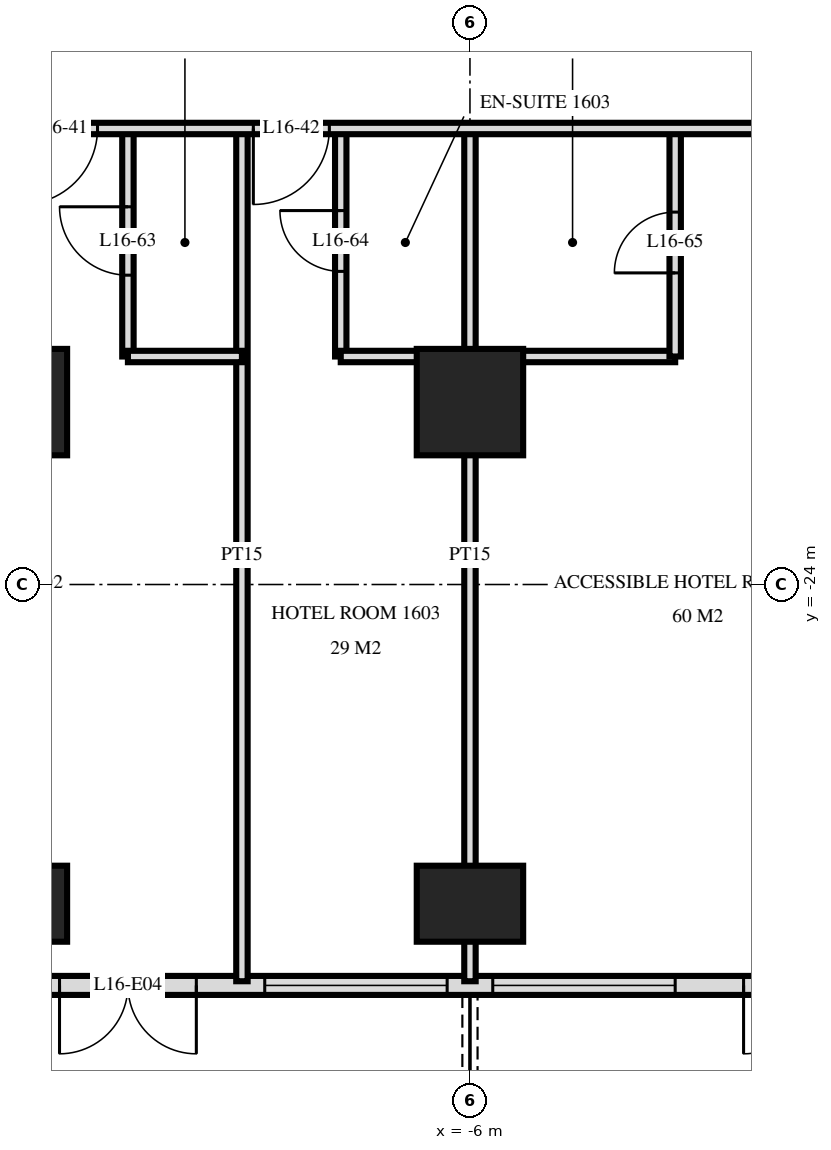
"""IFC4 building model, lengths in metres.
Left out: names, types, materials, properties, quantities, classifications, styles, units other than length and angle.
Written with IfcOpenShell. Run it as: python <this file> out.ifc"""

import sys

from ifc_helpers import new_model, si_unit, direction, frame, frame_2d, origin, origin_2d, place, context, subcontext, project, spatial, rectangle, extrude, element, fill, save


model = new_model("IFC4")
c1 = context("Model", 3, precision=1e-05, world=origin(), true_north=direction((0.0, 1.0)))
c2 = subcontext(c1, "Body", "Model", "MODEL_VIEW")
j1 = project(units=[si_unit("LENGTHUNIT", "METRE"), si_unit("PLANEANGLEUNIT", "RADIAN")], contexts=[c1])
p1 = place(None, origin())
s1 = spatial("IfcSite", under=j1, at=p1, CompositionType="ELEMENT")
p2 = place(p1, origin())
s2 = spatial("IfcBuilding", under=s1, at=p2, CompositionType="ELEMENT")
p3 = place(p2, frame((0.0, 0.0, 67.2)))
s3 = spatial("IfcBuildingStorey", under=s2, at=p3, CompositionType="ELEMENT", Elevation=67.2)
p4 = place(p3, frame((-12.0, -28.2, 0.0), z_axis=(0.0, 0.0, 1.0), x_axis=(1.0, 0.0, 0.0)))
e1 = element("IfcColumn", 1, at=p4, inside=s3, PredefinedType="COLUMN", context=c2, shape_type="SweptSolid", body=[
    extrude(rectangle(XDim=1.4, YDim=1.0, at=origin_2d()), origin(), (0.0, 0.0, 1.0), 3.6),
])
p5 = place(p3, frame((-12.0, -21.6, 0.0), z_axis=(0.0, 0.0, 1.0), x_axis=(1.0, 0.0, 0.0)))
e2 = element("IfcColumn", 2, at=p5, inside=s3, PredefinedType="COLUMN", context=c2, shape_type="SweptSolid", body=[
    extrude(rectangle(XDim=1.4, YDim=1.4, at=origin_2d()), origin(), (0.0, 0.0, 1.0), 3.6),
])
p6 = place(p3, frame((-6.0, -28.2, 0.0), z_axis=(0.0, 0.0, 1.0), x_axis=(1.0, 0.0, 0.0)))
e3 = element("IfcColumn", 3, at=p6, inside=s3, PredefinedType="COLUMN", context=c2, shape_type="SweptSolid", body=[
    extrude(rectangle(XDim=1.4, YDim=1.0, at=origin_2d()), origin(), (0.0, 0.0, 1.0), 3.6),
])
p7 = place(p3, frame((-6.0, -21.6, 0.0), z_axis=(0.0, 0.0, 1.0), x_axis=(1.0, 0.0, 0.0)))
e4 = element("IfcColumn", 4, at=p7, inside=s3, PredefinedType="COLUMN", context=c2, shape_type="SweptSolid", body=[
    extrude(rectangle(XDim=1.4, YDim=1.4, at=origin_2d()), origin(), (0.0, 0.0, 1.0), 3.6),
])
p8 = place(p3, frame((-28.775, -29.275, 0.0), z_axis=(0.0, 0.0, 1.0), x_axis=(1.0, 0.0, 0.0)))
e5 = element("IfcWall", 5, at=p8, inside=s3, PredefinedType="SOLIDWALL", context=c2, shape_type="SweptSolid", body=[
    extrude(rectangle(XDim=57.551, YDim=0.25, at=frame_2d((28.775, 0.0))), origin(), (0.0, 0.0, 1.0), 3.32),
])
p9 = place(p8, frame((0.575, 0.0, 0.0)))
e6 = element("IfcOpeningElement", 6, at=p9, cuts=e5, PredefinedType="OPENING", context=c2, shape_type="SweptSolid", body=[
    extrude(rectangle(XDim=1.8, YDim=2.4, at=frame_2d((0.9, 1.2))), frame((0.0, 0.135, 0.0), z_axis=(0.0, -1.0, 0.0), x_axis=(1.0, 0.0, 0.0)), (0.0, 0.0, 1.0), 0.27),
])
p10 = place(p8, frame((5.075, 0.0, 0.3)))
e7 = element("IfcOpeningElement", 7, at=p10, cuts=e5, PredefinedType="OPENING", context=c2, shape_type="SweptSolid", body=[
    extrude(rectangle(XDim=2.4, YDim=2.1, at=frame_2d((1.2, 1.05))), frame((0.0, 0.135, 0.0), z_axis=(0.0, -1.0, 0.0), x_axis=(1.0, 0.0, 0.0)), (0.0, 0.0, 1.0), 0.27),
])
p11 = place(p8, frame((8.375, 0.0, 0.0)))
e8 = element("IfcOpeningElement", 8, at=p11, cuts=e5, PredefinedType="OPENING", context=c2, shape_type="SweptSolid", body=[
    extrude(rectangle(XDim=1.8, YDim=2.4, at=frame_2d((0.9, 1.2))), frame((0.0, 0.135, 0.0), z_axis=(0.0, -1.0, 0.0), x_axis=(1.0, 0.0, 0.0)), (0.0, 0.0, 1.0), 0.27),
])
p12 = place(p8, frame((11.375, 0.0, 0.0)))
e9 = element("IfcOpeningElement", 9, at=p12, cuts=e5, PredefinedType="OPENING", context=c2, shape_type="SweptSolid", body=[
    extrude(rectangle(XDim=1.8, YDim=2.4, at=frame_2d((0.9, 1.2))), frame((0.0, 0.135, 0.0), z_axis=(0.0, -1.0, 0.0), x_axis=(1.0, 0.0, 0.0)), (0.0, 0.0, 1.0), 0.27),
])
p13 = place(p8, frame((14.075, 0.0, 0.3)))
e10 = element("IfcOpeningElement", 10, at=p13, cuts=e5, PredefinedType="OPENING", context=c2, shape_type="SweptSolid", body=[
    extrude(rectangle(XDim=2.4, YDim=2.1, at=frame_2d((1.2, 1.05))), frame((0.0, 0.135, 0.0), z_axis=(0.0, -1.0, 0.0), x_axis=(1.0, 0.0, 0.0)), (0.0, 0.0, 1.0), 0.27),
])
p14 = place(p8, frame((17.375, 0.0, 0.0)))
e11 = element("IfcOpeningElement", 11, at=p14, cuts=e5, PredefinedType="OPENING", context=c2, shape_type="SweptSolid", body=[
    extrude(rectangle(XDim=1.8, YDim=2.4, at=frame_2d((0.9, 1.2))), frame((0.0, 0.135, 0.0), z_axis=(0.0, -1.0, 0.0), x_axis=(1.0, 0.0, 0.0)), (0.0, 0.0, 1.0), 0.27),
])
p15 = place(p8, frame((20.075, 0.0, 0.3)))
e12 = element("IfcOpeningElement", 12, at=p15, cuts=e5, PredefinedType="OPENING", context=c2, shape_type="SweptSolid", body=[
    extrude(rectangle(XDim=2.4, YDim=2.1, at=frame_2d((1.2, 1.05))), frame((0.0, 0.135, 0.0), z_axis=(0.0, -1.0, 0.0), x_axis=(1.0, 0.0, 0.0)), (0.0, 0.0, 1.0), 0.27),
])
p16 = place(p8, frame((23.075, 0.0, 0.3)))
e13 = element("IfcOpeningElement", 13, at=p16, cuts=e5, PredefinedType="OPENING", context=c2, shape_type="SweptSolid", body=[
    extrude(rectangle(XDim=2.4, YDim=2.1, at=frame_2d((1.2, 1.05))), frame((0.0, 0.135, 0.0), z_axis=(0.0, -1.0, 0.0), x_axis=(1.0, 0.0, 0.0)), (0.0, 0.0, 1.0), 0.27),
])
p17 = place(p8, frame((26.375, 0.0, 0.0)))
e14 = element("IfcOpeningElement", 14, at=p17, cuts=e5, PredefinedType="OPENING", context=c2, shape_type="SweptSolid", body=[
    extrude(rectangle(XDim=1.8, YDim=2.4, at=frame_2d((0.9, 1.2))), frame((0.0, 0.135, 0.0), z_axis=(0.0, -1.0, 0.0), x_axis=(1.0, 0.0, 0.0)), (0.0, 0.0, 1.0), 0.27),
])
p18 = place(p8, frame((29.375, 0.0, 0.0)))
e15 = element("IfcOpeningElement", 15, at=p18, cuts=e5, PredefinedType="OPENING", context=c2, shape_type="SweptSolid", body=[
    extrude(rectangle(XDim=1.8, YDim=2.4, at=frame_2d((0.9, 1.2))), frame((0.0, 0.135, 0.0), z_axis=(0.0, -1.0, 0.0), x_axis=(1.0, 0.0, 0.0)), (0.0, 0.0, 1.0), 0.27),
])
p19 = place(p8, frame((32.075, 0.0, 0.3)))
e16 = element("IfcOpeningElement", 16, at=p19, cuts=e5, PredefinedType="OPENING", context=c2, shape_type="SweptSolid", body=[
    extrude(rectangle(XDim=2.4, YDim=2.1, at=frame_2d((1.2, 1.05))), frame((0.0, 0.135, 0.0), z_axis=(0.0, -1.0, 0.0), x_axis=(1.0, 0.0, 0.0)), (0.0, 0.0, 1.0), 0.27),
])
p20 = place(p8, frame((35.375, 0.0, 0.0)))
e17 = element("IfcOpeningElement", 17, at=p20, cuts=e5, PredefinedType="OPENING", context=c2, shape_type="SweptSolid", body=[
    extrude(rectangle(XDim=1.8, YDim=2.4, at=frame_2d((0.9, 1.2))), frame((0.0, 0.135, 0.0), z_axis=(0.0, -1.0, 0.0), x_axis=(1.0, 0.0, 0.0)), (0.0, 0.0, 1.0), 0.27),
])
p21 = place(p8, frame((38.075, 0.0, 0.3)))
e18 = element("IfcOpeningElement", 18, at=p21, cuts=e5, PredefinedType="OPENING", context=c2, shape_type="SweptSolid", body=[
    extrude(rectangle(XDim=2.4, YDim=2.1, at=frame_2d((1.2, 1.05))), frame((0.0, 0.135, 0.0), z_axis=(0.0, -1.0, 0.0), x_axis=(1.0, 0.0, 0.0)), (0.0, 0.0, 1.0), 0.27),
])
p22 = place(p8, frame((41.075, 0.0, 0.3)))
e19 = element("IfcOpeningElement", 19, at=p22, cuts=e5, PredefinedType="OPENING", context=c2, shape_type="SweptSolid", body=[
    extrude(rectangle(XDim=2.4, YDim=2.1, at=frame_2d((1.2, 1.05))), frame((0.0, 0.135, 0.0), z_axis=(0.0, -1.0, 0.0), x_axis=(1.0, 0.0, 0.0)), (0.0, 0.0, 1.0), 0.27),
])
p23 = place(p8, frame((44.375, 0.0, 0.0)))
e20 = element("IfcOpeningElement", 20, at=p23, cuts=e5, PredefinedType="OPENING", context=c2, shape_type="SweptSolid", body=[
    extrude(rectangle(XDim=1.8, YDim=2.4, at=frame_2d((0.9, 1.2))), frame((0.0, 0.135, 0.0), z_axis=(0.0, -1.0, 0.0), x_axis=(1.0, 0.0, 0.0)), (0.0, 0.0, 1.0), 0.27),
])
p24 = place(p8, frame((47.075, 0.0, 0.3)))
e21 = element("IfcOpeningElement", 21, at=p24, cuts=e5, PredefinedType="OPENING", context=c2, shape_type="SweptSolid", body=[
    extrude(rectangle(XDim=2.4, YDim=2.1, at=frame_2d((1.2, 1.05))), frame((0.0, 0.135, 0.0), z_axis=(0.0, -1.0, 0.0), x_axis=(1.0, 0.0, 0.0)), (0.0, 0.0, 1.0), 0.27),
])
p25 = place(p8, frame((50.375, 0.0, 0.0)))
e22 = element("IfcOpeningElement", 22, at=p25, cuts=e5, PredefinedType="OPENING", context=c2, shape_type="SweptSolid", body=[
    extrude(rectangle(XDim=1.8, YDim=2.4, at=frame_2d((0.9, 1.2))), frame((0.0, 0.135, 0.0), z_axis=(0.0, -1.0, 0.0), x_axis=(1.0, 0.0, 0.0)), (0.0, 0.0, 1.0), 0.27),
])
p26 = place(p8, frame((53.375, 0.0, 0.0)))
e23 = element("IfcOpeningElement", 23, at=p26, cuts=e5, PredefinedType="OPENING", context=c2, shape_type="SweptSolid", body=[
    extrude(rectangle(XDim=1.8, YDim=2.4, at=frame_2d((0.9, 1.2))), frame((0.0, 0.135, 0.0), z_axis=(0.0, -1.0, 0.0), x_axis=(1.0, 0.0, 0.0)), (0.0, 0.0, 1.0), 0.27),
])
p27 = place(p3, frame((-3.3, -21.0, 0.0), z_axis=(0.0, 0.0, 1.0), x_axis=(0.0, 1.0, 0.0)))
e24 = element("IfcWall", 24, at=p27, inside=s3, PredefinedType="PARTITIONING", context=c2, shape_type="SweptSolid", body=[
    extrude(rectangle(XDim=3.0, YDim=0.15, at=frame_2d((1.5, 0.0))), origin(), (0.0, 0.0, 1.0), 3.32),
])
p28 = place(p27, frame((1.1, 0.0, 0.0)))
e25 = element("IfcOpeningElement", 25, at=p28, cuts=e24, PredefinedType="OPENING", context=c2, shape_type="SweptSolid", body=[
    extrude(rectangle(XDim=0.8, YDim=2.1, at=frame_2d((0.4, 1.05))), frame((0.0, 0.085, 0.0), z_axis=(0.0, -1.0, 0.0), x_axis=(1.0, 0.0, 0.0)), (0.0, 0.0, 1.0), 0.17),
])
p29 = place(p3, frame((-6.0, -29.22, 0.0), z_axis=(0.0, 0.0, 1.0), x_axis=(0.0, 1.0, 0.0)))
e26 = element("IfcWall", 26, at=p29, inside=s3, PredefinedType="PARTITIONING", context=c2, shape_type="SweptSolid", body=[
    extrude(rectangle(XDim=11.22, YDim=0.15, at=frame_2d((5.61, 0.0))), origin(), (0.0, 0.0, 1.0), 3.32),
])
p30 = place(p3, frame((-7.7, -21.0, 0.0), z_axis=(0.0, 0.0, 1.0), x_axis=(0.0, 1.0, 0.0)))
e27 = element("IfcWall", 27, at=p30, inside=s3, PredefinedType="PARTITIONING", context=c2, shape_type="SweptSolid", body=[
    extrude(rectangle(XDim=3.0, YDim=0.15, at=frame_2d((1.5, 0.0))), origin(), (0.0, 0.0, 1.0), 3.32),
])
p31 = place(p30, frame((1.12, 0.0, 0.0)))
e28 = element("IfcOpeningElement", 28, at=p31, cuts=e27, PredefinedType="OPENING", context=c2, shape_type="SweptSolid", body=[
    extrude(rectangle(XDim=0.8, YDim=2.1, at=frame_2d((0.4, 1.05))), frame((0.0, 0.085, 0.0), z_axis=(0.0, -1.0, 0.0), x_axis=(1.0, 0.0, 0.0)), (0.0, 0.0, 1.0), 0.17),
])
p32 = place(p3, frame((-9.0, -29.22, 0.0), z_axis=(0.0, 0.0, 1.0), x_axis=(0.0, 1.0, 0.0)))
e29 = element("IfcWall", 29, at=p32, inside=s3, PredefinedType="PARTITIONING", context=c2, shape_type="SweptSolid", body=[
    extrude(rectangle(XDim=11.22, YDim=0.15, at=frame_2d((5.61, 0.0))), origin(), (0.0, 0.0, 1.0), 3.32),
])
p33 = place(p3, frame((-10.5, -21.0, 0.0), z_axis=(0.0, 0.0, 1.0), x_axis=(0.0, 1.0, 0.0)))
e30 = element("IfcWall", 30, at=p33, inside=s3, PredefinedType="PARTITIONING", context=c2, shape_type="SweptSolid", body=[
    extrude(rectangle(XDim=3.0, YDim=0.15, at=frame_2d((1.5, 0.0))), origin(), (0.0, 0.0, 1.0), 3.32),
])
p34 = place(p33, frame((1.07, 0.0, 0.0)))
e31 = element("IfcOpeningElement", 31, at=p34, cuts=e30, PredefinedType="OPENING", context=c2, shape_type="SweptSolid", body=[
    extrude(rectangle(XDim=0.9, YDim=2.1, at=frame_2d((0.45, 1.05))), frame((0.0, 0.085, 0.0), z_axis=(0.0, -1.0, 0.0), x_axis=(1.0, 0.0, 0.0)), (0.0, 0.0, 1.0), 0.17),
])
p35 = place(p3, frame((-10.5, -21.0, 0.0), z_axis=(0.0, 0.0, 1.0), x_axis=(1.0, 0.0, 0.0)))
e32 = element("IfcWall", 32, at=p35, inside=s3, PredefinedType="PARTITIONING", context=c2, shape_type="SweptSolid", body=[
    extrude(rectangle(XDim=1.5, YDim=0.15, at=frame_2d((0.75, 0.0))), origin(), (0.0, 0.0, 1.0), 3.32),
])
p36 = place(p3, frame((-7.7, -21.0, 0.0), z_axis=(0.0, 0.0, 1.0), x_axis=(1.0, 0.0, 0.0)))
e33 = element("IfcWall", 33, at=p36, inside=s3, PredefinedType="PARTITIONING", context=c2, shape_type="SweptSolid", body=[
    extrude(rectangle(XDim=4.4, YDim=0.15, at=frame_2d((2.2, 0.0))), origin(), (0.0, 0.0, 1.0), 3.32),
])
p37 = place(p3, frame((-33.12, -18.0, 0.0), z_axis=(0.0, 0.0, 1.0), x_axis=(1.0, 0.0, 0.0)))
e34 = element("IfcWall", 34, at=p37, inside=s3, PredefinedType="PARTITIONING", context=c2, shape_type="SweptSolid", body=[
    extrude(rectangle(XDim=66.24, YDim=0.15, at=frame_2d((33.12, 0.0))), origin(), (0.0, 0.0, 1.0), 3.32),
])
p38 = place(p37, frame((15.27, 0.0, 0.0)))
e35 = element("IfcOpeningElement", 35, at=p38, cuts=e34, PredefinedType="OPENING", context=c2, shape_type="SweptSolid", body=[
    extrude(rectangle(XDim=1.0, YDim=2.1, at=frame_2d((0.5, 1.05))), frame((0.0, 0.085, 0.0), z_axis=(0.0, -1.0, 0.0), x_axis=(1.0, 0.0, 0.0)), (0.0, 0.0, 1.0), 0.17),
])
p39 = place(p37, frame((21.22, 0.0, 0.0)))
e36 = element("IfcOpeningElement", 36, at=p39, cuts=e34, PredefinedType="OPENING", context=c2, shape_type="SweptSolid", body=[
    extrude(rectangle(XDim=1.0, YDim=2.1, at=frame_2d((0.5, 1.05))), frame((0.0, 0.085, 0.0), z_axis=(0.0, -1.0, 0.0), x_axis=(1.0, 0.0, 0.0)), (0.0, 0.0, 1.0), 0.17),
])
p40 = place(p37, frame((24.27, 0.0, 0.0)))
e37 = element("IfcOpeningElement", 37, at=p40, cuts=e34, PredefinedType="OPENING", context=c2, shape_type="SweptSolid", body=[
    extrude(rectangle(XDim=1.0, YDim=2.1, at=frame_2d((0.5, 1.05))), frame((0.0, 0.085, 0.0), z_axis=(0.0, -1.0, 0.0), x_axis=(1.0, 0.0, 0.0)), (0.0, 0.0, 1.0), 0.17),
])
p41 = place(p37, frame((30.97, 0.0, 0.0)))
e38 = element("IfcOpeningElement", 38, at=p41, cuts=e34, PredefinedType="OPENING", context=c2, shape_type="SweptSolid", body=[
    extrude(rectangle(XDim=1.0, YDim=2.1, at=frame_2d((0.5, 1.05))), frame((0.0, 0.085, 0.0), z_axis=(0.0, -1.0, 0.0), x_axis=(1.0, 0.0, 0.0)), (0.0, 0.0, 1.0), 0.17),
])
p42 = place(p37, frame((40.42, 0.0, 0.0)))
e39 = element("IfcOpeningElement", 39, at=p42, cuts=e34, PredefinedType="OPENING", context=c2, shape_type="SweptSolid", body=[
    extrude(rectangle(XDim=1.0, YDim=2.1, at=frame_2d((0.5, 1.05))), frame((0.0, 0.085, 0.0), z_axis=(0.0, -1.0, 0.0), x_axis=(1.0, 0.0, 0.0)), (0.0, 0.0, 1.0), 0.17),
])
p43 = place(p37, frame((43.97, 0.0, 0.0)))
e40 = element("IfcOpeningElement", 40, at=p43, cuts=e34, PredefinedType="OPENING", context=c2, shape_type="SweptSolid", body=[
    extrude(rectangle(XDim=1.0, YDim=2.1, at=frame_2d((0.5, 1.05))), frame((0.0, 0.085, 0.0), z_axis=(0.0, -1.0, 0.0), x_axis=(1.0, 0.0, 0.0)), (0.0, 0.0, 1.0), 0.17),
])
p44 = place(p37, frame((45.52, 0.0, 0.0)))
e41 = element("IfcOpeningElement", 41, at=p44, cuts=e34, PredefinedType="OPENING", context=c2, shape_type="SweptSolid", body=[
    extrude(rectangle(XDim=1.0, YDim=2.1, at=frame_2d((0.5, 1.05))), frame((0.0, 0.085, 0.0), z_axis=(0.0, -1.0, 0.0), x_axis=(1.0, 0.0, 0.0)), (0.0, 0.0, 1.0), 0.17),
])
p45 = place(p37, frame((52.97, 0.0, 0.0)))
e42 = element("IfcOpeningElement", 42, at=p45, cuts=e34, PredefinedType="OPENING", context=c2, shape_type="SweptSolid", body=[
    extrude(rectangle(XDim=1.0, YDim=2.1, at=frame_2d((0.5, 1.05))), frame((0.0, 0.085, 0.0), z_axis=(0.0, -1.0, 0.0), x_axis=(1.0, 0.0, 0.0)), (0.0, 0.0, 1.0), 0.17),
])
p46 = place(p37, frame((54.27, 0.0, 0.0)))
e43 = element("IfcOpeningElement", 43, at=p46, cuts=e34, PredefinedType="OPENING", context=c2, shape_type="SweptSolid", body=[
    extrude(rectangle(XDim=1.0, YDim=2.1, at=frame_2d((0.5, 1.05))), frame((0.0, 0.085, 0.0), z_axis=(0.0, -1.0, 0.0), x_axis=(1.0, 0.0, 0.0)), (0.0, 0.0, 1.0), 0.17),
])
p47 = place(p37, frame((13.42, 0.0, 0.0)))
e44 = element("IfcOpeningElement", 44, at=p47, cuts=e34, PredefinedType="OPENING", context=c2, shape_type="SweptSolid", body=[
    extrude(rectangle(XDim=1.0, YDim=2.1, at=frame_2d((0.5, 1.05))), frame((0.0, 0.085, 0.0), z_axis=(0.0, -1.0, 0.0), x_axis=(1.0, 0.0, 0.0)), (0.0, 0.0, 1.0), 0.17),
])
p48 = place(p37, frame((60.82, 0.0, 0.0)))
e45 = element("IfcOpeningElement", 45, at=p48, cuts=e34, PredefinedType="OPENING", context=c2, shape_type="SweptSolid", body=[
    extrude(rectangle(XDim=1.0, YDim=2.1, at=frame_2d((0.5, 1.05))), frame((0.0, 0.085, 0.0), z_axis=(0.0, -1.0, 0.0), x_axis=(1.0, 0.0, 0.0)), (0.0, 0.0, 1.0), 0.17),
])
p49 = place(p14, frame((0.9, 0.0, 0.0), z_axis=(0.0, 0.0, 1.0), x_axis=(-1.0, 0.0, 0.0)))
e46 = element("IfcDoor", 46, at=p49, inside=s3, OperationType="DOUBLE_DOOR_SINGLE_SWING", PredefinedType="DOOR", context=c2, shape_type="SweptSolid", body=[
    extrude(rectangle(XDim=1.8, YDim=2.4, at=frame_2d((0.0, 1.2))), frame((0.0, -0.025, 0.0), z_axis=(0.0, 1.0, 0.0), x_axis=(-1.0, 0.0, 0.0)), (0.0, 0.0, 1.0), 0.05),
])
fill(e11, e46)
p50 = place(p15, origin())
e47 = element("IfcWindow", 47, at=p50, inside=s3, PartitioningType="SINGLE_PANEL", PredefinedType="WINDOW", context=c2, shape_type="SweptSolid", body=[
    extrude(rectangle(XDim=2.4, YDim=2.1, at=frame_2d((1.2, 1.05))), frame((0.0, 0.03, 0.0), z_axis=(0.0, -1.0, 0.0), x_axis=(1.0, 0.0, 0.0)), (0.0, 0.0, 1.0), 0.06),
])
fill(e12, e47)
p51 = place(p16, origin())
e48 = element("IfcWindow", 48, at=p51, inside=s3, PartitioningType="SINGLE_PANEL", PredefinedType="WINDOW", context=c2, shape_type="SweptSolid", body=[
    extrude(rectangle(XDim=2.4, YDim=2.1, at=frame_2d((1.2, 1.05))), frame((0.0, 0.03, 0.0), z_axis=(0.0, -1.0, 0.0), x_axis=(1.0, 0.0, 0.0)), (0.0, 0.0, 1.0), 0.06),
])
fill(e13, e48)
p52 = place(p17, frame((0.9, 0.0, 0.0), z_axis=(0.0, 0.0, 1.0), x_axis=(-1.0, 0.0, 0.0)))
e49 = element("IfcDoor", 49, at=p52, inside=s3, OperationType="DOUBLE_DOOR_SINGLE_SWING", PredefinedType="DOOR", context=c2, shape_type="SweptSolid", body=[
    extrude(rectangle(XDim=1.8, YDim=2.4, at=frame_2d((0.0, 1.2))), frame((0.0, -0.025, 0.0), z_axis=(0.0, 1.0, 0.0), x_axis=(-1.0, 0.0, 0.0)), (0.0, 0.0, 1.0), 0.05),
])
fill(e14, e49)
p53 = place(p39, frame((0.5, 0.0, 0.0), z_axis=(0.0, 0.0, 1.0), x_axis=(-1.0, 0.0, 0.0)))
e50 = element("IfcDoor", 50, at=p53, inside=s3, OperationType="SINGLE_SWING_LEFT", PredefinedType="DOOR", context=c2, shape_type="SweptSolid", body=[
    extrude(rectangle(XDim=1.0, YDim=2.1, at=frame_2d((0.0, 1.05))), frame((0.0, -0.025, 0.0), z_axis=(0.0, 1.0, 0.0), x_axis=(-1.0, 0.0, 0.0)), (0.0, 0.0, 1.0), 0.05),
])
fill(e36, e50)
p54 = place(p40, frame((0.5, 0.0, 0.0), z_axis=(0.0, 0.0, 1.0), x_axis=(-1.0, 0.0, 0.0)))
e51 = element("IfcDoor", 51, at=p54, inside=s3, OperationType="SINGLE_SWING_LEFT", PredefinedType="DOOR", context=c2, shape_type="SweptSolid", body=[
    extrude(rectangle(XDim=1.0, YDim=2.1, at=frame_2d((0.0, 1.05))), frame((0.0, -0.025, 0.0), z_axis=(0.0, 1.0, 0.0), x_axis=(-1.0, 0.0, 0.0)), (0.0, 0.0, 1.0), 0.05),
])
fill(e37, e51)
p55 = place(p34, origin())
e52 = element("IfcDoor", 52, at=p55, inside=s3, OperationType="SINGLE_SWING_LEFT", PredefinedType="DOOR", context=c2, shape_type="SweptSolid", body=[
    extrude(rectangle(XDim=0.9, YDim=2.1, at=frame_2d((0.45, 1.05))), frame((0.0, 0.025, 0.0), z_axis=(0.0, -1.0, 0.0), x_axis=(1.0, 0.0, 0.0)), (0.0, 0.0, 1.0), 0.05),
])
fill(e31, e52)
p56 = place(p31, origin())
e53 = element("IfcDoor", 53, at=p56, inside=s3, OperationType="SINGLE_SWING_LEFT", PredefinedType="DOOR", context=c2, shape_type="SweptSolid", body=[
    extrude(rectangle(XDim=0.8, YDim=2.1, at=frame_2d((0.4, 1.05))), frame((0.0, 0.025, 0.0), z_axis=(0.0, -1.0, 0.0), x_axis=(1.0, 0.0, 0.0)), (0.0, 0.0, 1.0), 0.05),
])
fill(e28, e53)
p57 = place(p28, origin())
e54 = element("IfcDoor", 54, at=p57, inside=s3, OperationType="SINGLE_SWING_RIGHT", PredefinedType="DOOR", context=c2, shape_type="SweptSolid", body=[
    extrude(rectangle(XDim=0.8, YDim=2.1, at=frame_2d((0.4, 1.05))), frame((0.0, 0.025, 0.0), z_axis=(0.0, -1.0, 0.0), x_axis=(1.0, 0.0, 0.0)), (0.0, 0.0, 1.0), 0.05),
])
fill(e25, e54)
save(model, sys.argv[1])
